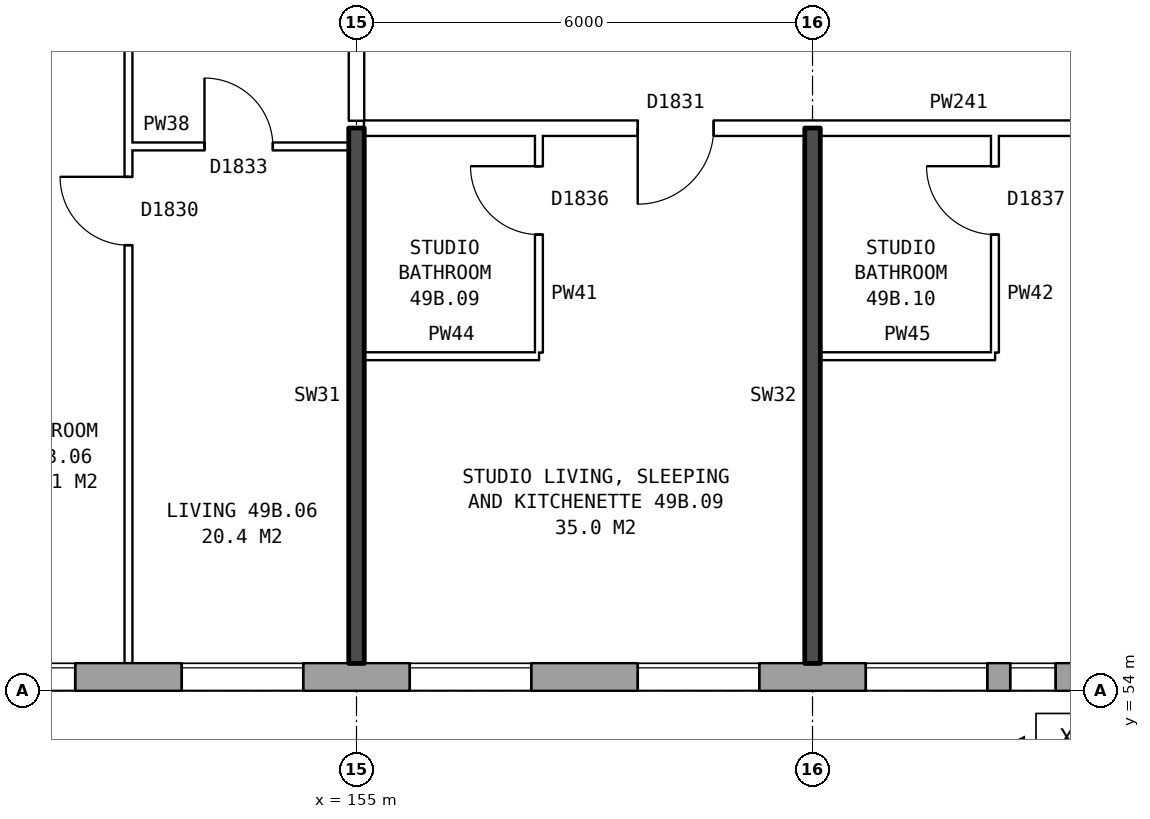
"""IFC4 building model, lengths in metres.
Left out: names, types, materials, properties, quantities, classifications, styles, units other than length and angle.
Written with IfcOpenShell. Run it as: python <this file> out.ifc"""

import sys

from ifc_helpers import new_model, si_unit, direction, frame, frame_2d, origin, place, context, subcontext, project, spatial, rectangle, extrude, element, fill, save


model = new_model("IFC4")
c1 = context("Model", 3, precision=1e-05, world=origin(), true_north=direction((0.0, 1.0)))
c2 = subcontext(c1, "Body", "Model", "MODEL_VIEW")
j1 = project(units=[si_unit("LENGTHUNIT", "METRE"), si_unit("PLANEANGLEUNIT", "RADIAN")], contexts=[c1])
p1 = place(None, origin())
s1 = spatial("IfcSite", under=j1, at=p1, CompositionType="ELEMENT")
p2 = place(p1, origin())
s2 = spatial("IfcBuilding", under=s1, at=p2, CompositionType="ELEMENT")
p3 = place(p2, frame((0.0, 0.0, 175.8)))
s3 = spatial("IfcBuildingStorey", under=s2, at=p3, CompositionType="ELEMENT", Elevation=175.8)
p4 = place(p3, frame((134.075, 54.18, 0.0), z_axis=(0.0, 0.0, 1.0), x_axis=(1.0, 0.0, 0.0)))
e1 = element("IfcWall", 1, at=p4, inside=s3, PredefinedType="STANDARD", context=c2, shape_type="SweptSolid", body=[
    extrude(rectangle(XDim=33.101, YDim=0.36, at=frame_2d((16.55, 0.0))), origin(), (0.0, 0.0, 1.0), 2.85),
])
p5 = place(p4, frame((0.3, 0.0, 0.8)))
e2 = element("IfcOpeningElement", 2, at=p5, cuts=e1, PredefinedType="OPENING", context=c2, shape_type="SweptSolid", body=[
    extrude(rectangle(XDim=0.6, YDim=1.8, at=frame_2d((0.3, 0.9))), frame((0.0, 0.19, 0.0), z_axis=(0.0, -1.0, 0.0), x_axis=(1.0, 0.0, 0.0)), (0.0, 0.0, 1.0), 0.38),
])
p6 = place(p4, frame((3.625, 0.0, 0.8)))
e3 = element("IfcOpeningElement", 3, at=p6, cuts=e1, PredefinedType="OPENING", context=c2, shape_type="SweptSolid", body=[
    extrude(rectangle(XDim=1.6, YDim=1.8, at=frame_2d((0.8, 0.9))), frame((0.0, 0.19, 0.0), z_axis=(0.0, -1.0, 0.0), x_axis=(1.0, 0.0, 0.0)), (0.0, 0.0, 1.0), 0.38),
])
p7 = place(p4, frame((6.625, 0.0, 0.8)))
e4 = element("IfcOpeningElement", 4, at=p7, cuts=e1, PredefinedType="OPENING", context=c2, shape_type="SweptSolid", body=[
    extrude(rectangle(XDim=1.6, YDim=1.8, at=frame_2d((0.8, 0.9))), frame((0.0, 0.19, 0.0), z_axis=(0.0, -1.0, 0.0), x_axis=(1.0, 0.0, 0.0)), (0.0, 0.0, 1.0), 0.38),
])
p8 = place(p4, frame((9.625, 0.0, 0.8)))
e5 = element("IfcOpeningElement", 5, at=p8, cuts=e1, PredefinedType="OPENING", context=c2, shape_type="SweptSolid", body=[
    extrude(rectangle(XDim=1.6, YDim=1.8, at=frame_2d((0.8, 0.9))), frame((0.0, 0.19, 0.0), z_axis=(0.0, -1.0, 0.0), x_axis=(1.0, 0.0, 0.0)), (0.0, 0.0, 1.0), 0.38),
])
p9 = place(p4, frame((12.625, 0.0, 0.8)))
e6 = element("IfcOpeningElement", 6, at=p9, cuts=e1, PredefinedType="OPENING", context=c2, shape_type="SweptSolid", body=[
    extrude(rectangle(XDim=1.6, YDim=1.8, at=frame_2d((0.8, 0.9))), frame((0.0, 0.19, 0.0), z_axis=(0.0, -1.0, 0.0), x_axis=(1.0, 0.0, 0.0)), (0.0, 0.0, 1.0), 0.38),
])
p10 = place(p4, frame((15.625, 0.0, 0.8)))
e7 = element("IfcOpeningElement", 7, at=p10, cuts=e1, PredefinedType="OPENING", context=c2, shape_type="SweptSolid", body=[
    extrude(rectangle(XDim=1.6, YDim=1.8, at=frame_2d((0.8, 0.9))), frame((0.0, 0.19, 0.0), z_axis=(0.0, -1.0, 0.0), x_axis=(1.0, 0.0, 0.0)), (0.0, 0.0, 1.0), 0.38),
])
p11 = place(p4, frame((18.625, 0.0, 0.8)))
e8 = element("IfcOpeningElement", 8, at=p11, cuts=e1, PredefinedType="OPENING", context=c2, shape_type="SweptSolid", body=[
    extrude(rectangle(XDim=1.6, YDim=1.8, at=frame_2d((0.8, 0.9))), frame((0.0, 0.19, 0.0), z_axis=(0.0, -1.0, 0.0), x_axis=(1.0, 0.0, 0.0)), (0.0, 0.0, 1.0), 0.38),
])
p12 = place(p4, frame((21.625, 0.0, 0.8)))
e9 = element("IfcOpeningElement", 9, at=p12, cuts=e1, PredefinedType="OPENING", context=c2, shape_type="SweptSolid", body=[
    extrude(rectangle(XDim=1.6, YDim=1.8, at=frame_2d((0.8, 0.9))), frame((0.0, 0.19, 0.0), z_axis=(0.0, -1.0, 0.0), x_axis=(1.0, 0.0, 0.0)), (0.0, 0.0, 1.0), 0.38),
])
p13 = place(p4, frame((24.625, 0.0, 0.8)))
e10 = element("IfcOpeningElement", 10, at=p13, cuts=e1, PredefinedType="OPENING", context=c2, shape_type="SweptSolid", body=[
    extrude(rectangle(XDim=1.6, YDim=1.8, at=frame_2d((0.8, 0.9))), frame((0.0, 0.19, 0.0), z_axis=(0.0, -1.0, 0.0), x_axis=(1.0, 0.0, 0.0)), (0.0, 0.0, 1.0), 0.38),
])
p14 = place(p4, frame((27.625, 0.0, 0.8)))
e11 = element("IfcOpeningElement", 11, at=p14, cuts=e1, PredefinedType="OPENING", context=c2, shape_type="SweptSolid", body=[
    extrude(rectangle(XDim=1.6, YDim=1.8, at=frame_2d((0.8, 0.9))), frame((0.0, 0.19, 0.0), z_axis=(0.0, -1.0, 0.0), x_axis=(1.0, 0.0, 0.0)), (0.0, 0.0, 1.0), 0.38),
])
p15 = place(p4, frame((29.525, 0.0, 0.8)))
e12 = element("IfcOpeningElement", 12, at=p15, cuts=e1, PredefinedType="OPENING", context=c2, shape_type="SweptSolid", body=[
    extrude(rectangle(XDim=0.6, YDim=0.9, at=frame_2d((0.3, 0.45))), frame((0.0, 0.19, 0.0), z_axis=(0.0, -1.0, 0.0), x_axis=(1.0, 0.0, 0.0)), (0.0, 0.0, 1.0), 0.38),
])
p16 = place(p4, frame((1.2, 0.0, 1.7)))
e13 = element("IfcOpeningElement", 13, at=p16, cuts=e1, PredefinedType="OPENING", context=c2, shape_type="SweptSolid", body=[
    extrude(rectangle(XDim=0.6, YDim=0.9, at=frame_2d((0.3, 0.45))), frame((0.0, 0.19, 0.0), z_axis=(0.0, -1.0, 0.0), x_axis=(1.0, 0.0, 0.0)), (0.0, 0.0, 1.0), 0.38),
])
p17 = place(p4, frame((31.575, 0.0, 1.4)))
e14 = element("IfcOpeningElement", 14, at=p17, cuts=e1, PredefinedType="OPENING", context=c2, shape_type="SweptSolid", body=[
    extrude(rectangle(XDim=1.2, YDim=1.2, at=frame_2d((0.6, 0.6))), frame((0.0, 0.19, 0.0), z_axis=(0.0, -1.0, 0.0), x_axis=(1.0, 0.0, 0.0)), (0.0, 0.0, 1.0), 0.38),
])
for number, where, z_axis, x_axis in (
    (15, (155.1, 58.4, 0.0), (0.0, 0.0, 1.0), (1.0, 0.0, 0.0)),
    (16, (161.1, 58.4, 0.0), (0.0, 0.0, 1.0), (1.0, 0.0, 0.0)),
):
    element("IfcWall", number, at=place(p3, frame(where, z_axis=z_axis, x_axis=x_axis)), inside=s3, PredefinedType="PARTITIONING", context=c2, shape_type="SweptSolid", body=[
        extrude(rectangle(XDim=2.3, YDim=0.1, at=frame_2d((1.15, 0.0))), origin(), (0.0, 0.0, 1.0), 2.85),
    ])
p18 = place(p3, frame((152.0, 61.16, 0.0), z_axis=(0.0, 0.0, 1.0), x_axis=(1.0, 0.0, 0.0)))
e17 = element("IfcWall", 17, at=p18, inside=s3, PredefinedType="PARTITIONING", context=c2, shape_type="SweptSolid", body=[
    extrude(rectangle(XDim=2.9, YDim=0.1, at=frame_2d((1.45, 0.0))), origin(), (0.0, 0.0, 1.0), 2.85),
])
p19 = place(p18, frame((1.0, 0.0, 0.0)))
e18 = element("IfcOpeningElement", 18, at=p19, cuts=e17, PredefinedType="OPENING", context=c2, shape_type="SweptSolid", body=[
    extrude(rectangle(XDim=0.9, YDim=2.1, at=frame_2d((0.45, 1.05))), frame((0.0, 0.06, 0.0), z_axis=(0.0, -1.0, 0.0), x_axis=(1.0, 0.0, 0.0)), (0.0, 0.0, 1.0), 0.12),
])
p20 = place(p3, frame((155.1, 61.4, 0.0), z_axis=(0.0, 0.0, 1.0), x_axis=(1.0, 0.0, 0.0)))
e19 = element("IfcWall", 19, at=p20, inside=s3, PredefinedType="PARTITIONING", context=c2, shape_type="SweptSolid", body=[
    extrude(rectangle(XDim=14.79, YDim=0.2, at=frame_2d((7.395, 0.0))), origin(), (0.0, 0.0, 1.0), 2.85),
])
p21 = place(p20, frame((3.6, 0.0, 0.0)))
e20 = element("IfcOpeningElement", 20, at=p21, cuts=e19, PredefinedType="OPENING", context=c2, shape_type="SweptSolid", body=[
    extrude(rectangle(XDim=1.0, YDim=2.1, at=frame_2d((0.5, 1.05))), frame((0.0, 0.11, 0.0), z_axis=(0.0, -1.0, 0.0), x_axis=(1.0, 0.0, 0.0)), (0.0, 0.0, 1.0), 0.22),
])
p22 = place(p20, frame((11.045, 0.0, 0.0)))
e21 = element("IfcOpeningElement", 21, at=p22, cuts=e19, PredefinedType="OPENING", context=c2, shape_type="SweptSolid", body=[
    extrude(rectangle(XDim=1.0, YDim=2.1, at=frame_2d((0.5, 1.05))), frame((0.0, 0.11, 0.0), z_axis=(0.0, -1.0, 0.0), x_axis=(1.0, 0.0, 0.0)), (0.0, 0.0, 1.0), 0.22),
])
p23 = place(p3, frame((152.0, 54.36, 0.0), z_axis=(0.0, 0.0, 1.0), x_axis=(0.0, 1.0, 0.0)))
e22 = element("IfcWall", 22, at=p23, inside=s3, PredefinedType="PARTITIONING", context=c2, shape_type="SweptSolid", body=[
    extrude(rectangle(XDim=14.34, YDim=0.1, at=frame_2d((7.17, 0.0))), origin(), (0.0, 0.0, 1.0), 2.85),
])
p24 = place(p23, frame((5.5, 0.0, 0.0)))
e23 = element("IfcOpeningElement", 23, at=p24, cuts=e22, PredefinedType="OPENING", context=c2, shape_type="SweptSolid", body=[
    extrude(rectangle(XDim=0.9, YDim=2.1, at=frame_2d((0.45, 1.05))), frame((0.0, 0.06, 0.0), z_axis=(0.0, -1.0, 0.0), x_axis=(1.0, 0.0, 0.0)), (0.0, 0.0, 1.0), 0.12),
])
p25 = place(p23, frame((13.04, 0.0, 0.0)))
e24 = element("IfcOpeningElement", 24, at=p25, cuts=e22, PredefinedType="OPENING", context=c2, shape_type="SweptSolid", body=[
    extrude(rectangle(XDim=0.9, YDim=2.1, at=frame_2d((0.45, 1.05))), frame((0.0, 0.06, 0.0), z_axis=(0.0, -1.0, 0.0), x_axis=(1.0, 0.0, 0.0)), (0.0, 0.0, 1.0), 0.12),
])
p26 = place(p3, frame((155.0, 54.36, 0.0), z_axis=(0.0, 0.0, 1.0), x_axis=(0.0, 1.0, 0.0)))
e25 = element("IfcWall", 25, at=p26, inside=s3, PredefinedType="SOLIDWALL", context=c2, shape_type="SweptSolid", body=[
    extrude(rectangle(XDim=7.04, YDim=0.2, at=frame_2d((3.52, 0.0))), origin(), (0.0, 0.0, 1.0), 2.85),
])
p27 = place(p3, frame((155.0, 61.5, 0.0), z_axis=(0.0, 0.0, 1.0), x_axis=(0.0, 1.0, 0.0)))
e26 = element("IfcWall", 26, at=p27, inside=s3, PredefinedType="PARTITIONING", context=c2, shape_type="SweptSolid", body=[
    extrude(rectangle(XDim=2.2, YDim=0.2, at=frame_2d((1.1, 0.0))), origin(), (0.0, 0.0, 1.0), 2.85),
])
p28 = place(p3, frame((157.4, 58.45, 0.0), z_axis=(0.0, 0.0, 1.0), x_axis=(0.0, 1.0, 0.0)))
e27 = element("IfcWall", 27, at=p28, inside=s3, PredefinedType="PARTITIONING", context=c2, shape_type="SweptSolid", body=[
    extrude(rectangle(XDim=2.85, YDim=0.1, at=frame_2d((1.425, 0.0))), origin(), (0.0, 0.0, 1.0), 2.85),
])
p29 = place(p28, frame((1.55, 0.0, 0.0)))
e28 = element("IfcOpeningElement", 28, at=p29, cuts=e27, PredefinedType="OPENING", context=c2, shape_type="SweptSolid", body=[
    extrude(rectangle(XDim=0.9, YDim=2.1, at=frame_2d((0.45, 1.05))), frame((0.0, 0.06, 0.0), z_axis=(0.0, -1.0, 0.0), x_axis=(1.0, 0.0, 0.0)), (0.0, 0.0, 1.0), 0.12),
])
p30 = place(p3, frame((161.0, 54.36, 0.0), z_axis=(0.0, 0.0, 1.0), x_axis=(0.0, 1.0, 0.0)))
e29 = element("IfcWall", 29, at=p30, inside=s3, PredefinedType="SOLIDWALL", context=c2, shape_type="SweptSolid", body=[
    extrude(rectangle(XDim=7.04, YDim=0.2, at=frame_2d((3.52, 0.0))), origin(), (0.0, 0.0, 1.0), 2.85),
])
p31 = place(p3, frame((163.4, 58.45, 0.0), z_axis=(0.0, 0.0, 1.0), x_axis=(0.0, 1.0, 0.0)))
e30 = element("IfcWall", 30, at=p31, inside=s3, PredefinedType="PARTITIONING", context=c2, shape_type="SweptSolid", body=[
    extrude(rectangle(XDim=2.85, YDim=0.1, at=frame_2d((1.425, 0.0))), origin(), (0.0, 0.0, 1.0), 2.85),
])
p32 = place(p31, frame((1.55, 0.0, 0.0)))
e31 = element("IfcOpeningElement", 31, at=p32, cuts=e30, PredefinedType="OPENING", context=c2, shape_type="SweptSolid", body=[
    extrude(rectangle(XDim=0.9, YDim=2.1, at=frame_2d((0.45, 1.05))), frame((0.0, 0.06, 0.0), z_axis=(0.0, -1.0, 0.0), x_axis=(1.0, 0.0, 0.0)), (0.0, 0.0, 1.0), 0.12),
])
p33 = place(p10, origin())
e32 = element("IfcWindow", 32, at=p33, inside=s3, PartitioningType="SINGLE_PANEL", PredefinedType="WINDOW", context=c2, shape_type="SweptSolid", body=[
    extrude(rectangle(XDim=1.6, YDim=1.8, at=frame_2d((0.8, 0.9))), frame((0.0, 0.15, 0.0), z_axis=(0.0, -1.0, 0.0), x_axis=(1.0, 0.0, 0.0)), (0.0, 0.0, 1.0), 0.06),
])
fill(e7, e32)
p34 = place(p11, origin())
e33 = element("IfcWindow", 33, at=p34, inside=s3, PartitioningType="SINGLE_PANEL", PredefinedType="WINDOW", context=c2, shape_type="SweptSolid", body=[
    extrude(rectangle(XDim=1.6, YDim=1.8, at=frame_2d((0.8, 0.9))), frame((0.0, 0.15, 0.0), z_axis=(0.0, -1.0, 0.0), x_axis=(1.0, 0.0, 0.0)), (0.0, 0.0, 1.0), 0.06),
])
fill(e8, e33)
p35 = place(p12, origin())
e34 = element("IfcWindow", 34, at=p35, inside=s3, PartitioningType="SINGLE_PANEL", PredefinedType="WINDOW", context=c2, shape_type="SweptSolid", body=[
    extrude(rectangle(XDim=1.6, YDim=1.8, at=frame_2d((0.8, 0.9))), frame((0.0, 0.15, 0.0), z_axis=(0.0, -1.0, 0.0), x_axis=(1.0, 0.0, 0.0)), (0.0, 0.0, 1.0), 0.06),
])
fill(e9, e34)
p36 = place(p13, origin())
e35 = element("IfcWindow", 35, at=p36, inside=s3, PartitioningType="SINGLE_PANEL", PredefinedType="WINDOW", context=c2, shape_type="SweptSolid", body=[
    extrude(rectangle(XDim=1.6, YDim=1.8, at=frame_2d((0.8, 0.9))), frame((0.0, 0.15, 0.0), z_axis=(0.0, -1.0, 0.0), x_axis=(1.0, 0.0, 0.0)), (0.0, 0.0, 1.0), 0.06),
])
fill(e10, e35)
p37 = place(p14, origin())
e36 = element("IfcWindow", 36, at=p37, inside=s3, PartitioningType="SINGLE_PANEL", PredefinedType="WINDOW", context=c2, shape_type="SweptSolid", body=[
    extrude(rectangle(XDim=1.6, YDim=1.8, at=frame_2d((0.8, 0.9))), frame((0.0, 0.15, 0.0), z_axis=(0.0, -1.0, 0.0), x_axis=(1.0, 0.0, 0.0)), (0.0, 0.0, 1.0), 0.06),
])
fill(e11, e36)
p38 = place(p15, origin())
e37 = element("IfcWindow", 37, at=p38, inside=s3, PartitioningType="SINGLE_PANEL", PredefinedType="WINDOW", context=c2, shape_type="SweptSolid", body=[
    extrude(rectangle(XDim=0.6, YDim=0.9, at=frame_2d((0.3, 0.45))), frame((0.0, 0.15, 0.0), z_axis=(0.0, -1.0, 0.0), x_axis=(1.0, 0.0, 0.0)), (0.0, 0.0, 1.0), 0.06),
])
fill(e12, e37)
p39 = place(p24, origin())
e38 = element("IfcDoor", 38, at=p39, inside=s3, OperationType="SINGLE_SWING_RIGHT", PredefinedType="DOOR", context=c2, shape_type="SweptSolid", body=[
    extrude(rectangle(XDim=0.9, YDim=2.1, at=frame_2d((0.45, 1.05))), frame((0.0, 0.025, 0.0), z_axis=(0.0, -1.0, 0.0), x_axis=(1.0, 0.0, 0.0)), (0.0, 0.0, 1.0), 0.05),
])
fill(e23, e38)
p40 = place(p19, origin())
e39 = element("IfcDoor", 39, at=p40, inside=s3, OperationType="SINGLE_SWING_LEFT", PredefinedType="DOOR", context=c2, shape_type="SweptSolid", body=[
    extrude(rectangle(XDim=0.9, YDim=2.1, at=frame_2d((0.45, 1.05))), frame((0.0, 0.025, 0.0), z_axis=(0.0, -1.0, 0.0), x_axis=(1.0, 0.0, 0.0)), (0.0, 0.0, 1.0), 0.05),
])
fill(e18, e39)
p41 = place(p21, frame((1.0, 0.0, 0.0), z_axis=(0.0, 0.0, 1.0), x_axis=(-1.0, 0.0, 0.0)))
e40 = element("IfcDoor", 40, at=p41, inside=s3, OperationType="SINGLE_SWING_RIGHT", PredefinedType="DOOR", context=c2, shape_type="SweptSolid", body=[
    extrude(rectangle(XDim=1.0, YDim=2.1, at=frame_2d((0.5, 1.05))), frame((0.0, 0.025, 0.0), z_axis=(0.0, -1.0, 0.0), x_axis=(1.0, 0.0, 0.0)), (0.0, 0.0, 1.0), 0.05),
])
fill(e20, e40)
p42 = place(p29, origin())
e41 = element("IfcDoor", 41, at=p42, inside=s3, OperationType="SINGLE_SWING_RIGHT", PredefinedType="DOOR", context=c2, shape_type="SweptSolid", body=[
    extrude(rectangle(XDim=0.9, YDim=2.1, at=frame_2d((0.45, 1.05))), frame((0.0, 0.025, 0.0), z_axis=(0.0, -1.0, 0.0), x_axis=(1.0, 0.0, 0.0)), (0.0, 0.0, 1.0), 0.05),
])
fill(e28, e41)
p43 = place(p32, origin())
e42 = element("IfcDoor", 42, at=p43, inside=s3, OperationType="SINGLE_SWING_RIGHT", PredefinedType="DOOR", context=c2, shape_type="SweptSolid", body=[
    extrude(rectangle(XDim=0.9, YDim=2.1, at=frame_2d((0.45, 1.05))), frame((0.0, 0.025, 0.0), z_axis=(0.0, -1.0, 0.0), x_axis=(1.0, 0.0, 0.0)), (0.0, 0.0, 1.0), 0.05),
])
fill(e31, e42)
save(model, sys.argv[1])
